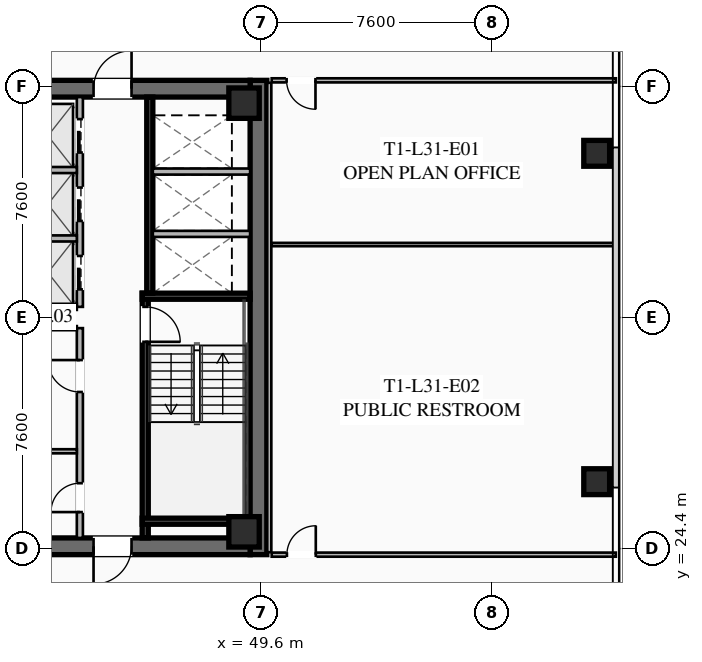
"""IFC4 building model, lengths in metres.
Left out: names, types, materials, properties, quantities, classifications, styles, units other than length and angle.
Written with IfcOpenShell. Run it as: python <this file> out.ifc"""

import sys

from ifc_helpers import new_model, si_unit, direction, frame, frame_2d, origin, origin_2d, place, context, subcontext, project, spatial, rectangle, hollow_rectangle, extrude, element, fill, save


model = new_model("IFC4")
c1 = context("Model", 3, precision=1e-05, world=origin(), true_north=direction((0.0, 1.0)))
c2 = subcontext(c1, "Body", "Model", "MODEL_VIEW")
j1 = project(units=[si_unit("LENGTHUNIT", "METRE"), si_unit("PLANEANGLEUNIT", "RADIAN")], contexts=[c1])
p1 = place(None, origin())
s1 = spatial("IfcSite", under=j1, at=p1, CompositionType="ELEMENT")
p2 = place(p1, origin())
s2 = spatial("IfcBuilding", under=s1, at=p2, CompositionType="ELEMENT")
p3 = place(p2, frame((0.0, 0.0, 117.95)))
s3 = spatial("IfcBuildingStorey", under=s2, at=p3, CompositionType="ELEMENT", Elevation=117.95)
p4 = place(p3, frame((49.525, 39.8, 0.0), z_axis=(0.0, 0.0, 1.0), x_axis=(0.0, -1.0, 0.0)))
e1 = element("IfcWall", 1, at=p4, inside=s3, PredefinedType="SHEAR", context=c2, shape_type="SweptSolid", body=[
    extrude(rectangle(XDim=15.6, YDim=0.55, at=frame_2d((7.8, 0.0))), origin(), (0.0, 0.0, 1.0), 3.55),
])
p5 = place(p3, frame((49.25, 24.475, 0.0), z_axis=(0.0, 0.0, 1.0), x_axis=(-1.0, 0.0, 0.0)))
e2 = element("IfcWall", 2, at=p5, inside=s3, PredefinedType="SHEAR", context=c2, shape_type="SweptSolid", body=[
    extrude(rectangle(XDim=14.5, YDim=0.55, at=frame_2d((7.25, 0.0))), origin(), (0.0, 0.0, 1.0), 3.55),
])
p6 = place(p5, frame((8.95, 0.0, 0.0)))
e3 = element("IfcOpeningElement", 3, at=p6, cuts=e2, PredefinedType="OPENING", context=c2, shape_type="SweptSolid", body=[
    extrude(rectangle(XDim=1.25, YDim=2.25, at=frame_2d((0.625, 1.125))), frame((0.0, 0.285, 0.0), z_axis=(0.0, -1.0, 0.0), x_axis=(1.0, 0.0, 0.0)), (0.0, 0.0, 1.0), 0.57),
])
p7 = place(p5, frame((3.9, 0.0, 0.0)))
e4 = element("IfcOpeningElement", 4, at=p7, cuts=e2, PredefinedType="OPENING", context=c2, shape_type="SweptSolid", body=[
    extrude(rectangle(XDim=1.25, YDim=2.25, at=frame_2d((0.625, 1.125))), frame((0.0, 0.285, 0.0), z_axis=(0.0, -1.0, 0.0), x_axis=(1.0, 0.0, 0.0)), (0.0, 0.0, 1.0), 0.57),
])
p8 = place(p3, frame((34.75, 39.525, 0.0), z_axis=(0.0, 0.0, 1.0), x_axis=(1.0, 0.0, 0.0)))
e5 = element("IfcWall", 5, at=p8, inside=s3, PredefinedType="SHEAR", context=c2, shape_type="SweptSolid", body=[
    extrude(rectangle(XDim=14.5, YDim=0.55, at=frame_2d((7.25, 0.0))), origin(), (0.0, 0.0, 1.0), 3.55),
])
p9 = place(p8, frame((4.3, 0.0, 0.0)))
e6 = element("IfcOpeningElement", 6, at=p9, cuts=e5, PredefinedType="OPENING", context=c2, shape_type="SweptSolid", body=[
    extrude(rectangle(XDim=1.25, YDim=2.25, at=frame_2d((0.625, 1.125))), frame((0.0, 0.285, 0.0), z_axis=(0.0, -1.0, 0.0), x_axis=(1.0, 0.0, 0.0)), (0.0, 0.0, 1.0), 0.57),
])
p10 = place(p8, frame((9.35, 0.0, 0.0)))
e7 = element("IfcOpeningElement", 7, at=p10, cuts=e5, PredefinedType="OPENING", context=c2, shape_type="SweptSolid", body=[
    extrude(rectangle(XDim=1.25, YDim=2.25, at=frame_2d((0.625, 1.125))), frame((0.0, 0.285, 0.0), z_axis=(0.0, -1.0, 0.0), x_axis=(1.0, 0.0, 0.0)), (0.0, 0.0, 1.0), 0.57),
])
for number, where, z_axis, x_axis in (
    (8, (49.05, 24.95, 0.0), (0.0, 0.0, 1.0), (1.0, 0.0, 0.0)),
    (9, (49.05, 39.05, 0.0), (0.0, 0.0, 1.0), (1.0, 0.0, 0.0)),
):
    element("IfcColumn", number, at=place(p3, frame(where, z_axis=z_axis, x_axis=x_axis)), inside=s3, PredefinedType="COLUMN", context=c2, shape_type="SweptSolid", body=[
        extrude(hollow_rectangle(XDim=1.0, YDim=1.0, WallThickness=0.04, at=origin_2d()), origin(), (0.0, 0.0, 1.0), 3.37),
    ])
for number, where, z_axis, x_axis in (
    (10, (60.65, 26.6, 0.0), (0.0, 0.0, 1.0), (1.0, 0.0, 0.0)),
    (11, (60.65, 37.4, 0.0), (0.0, 0.0, 1.0), (1.0, 0.0, 0.0)),
):
    element("IfcColumn", number, at=place(p3, frame(where, z_axis=z_axis, x_axis=x_axis)), inside=s3, PredefinedType="COLUMN", context=c2, shape_type="SweptSolid", body=[
        extrude(hollow_rectangle(XDim=0.85, YDim=0.85, WallThickness=0.035, at=origin_2d()), origin(), (0.0, 0.0, 1.0), 3.37),
    ])
p11 = place(p3, frame((45.8, 32.8, 0.0), z_axis=(0.0, 0.0, 1.0), x_axis=(0.0, -1.0, 0.0)))
e12 = element("IfcWall", 12, at=p11, inside=s3, PredefinedType="SHEAR", context=c2, shape_type="SweptSolid", body=[
    extrude(rectangle(XDim=8.05, YDim=0.2, at=frame_2d((4.025, 0.0))), origin(), (0.0, 0.0, 1.0), 3.37),
])
p12 = place(p11, frame((0.45, 0.0, 0.0)))
e13 = element("IfcOpeningElement", 13, at=p12, cuts=e12, PredefinedType="OPENING", context=c2, shape_type="SweptSolid", body=[
    extrude(rectangle(XDim=1.15, YDim=2.2, at=frame_2d((0.575, 1.1))), frame((0.0, 0.11, 0.0), z_axis=(0.0, -1.0, 0.0), x_axis=(1.0, 0.0, 0.0)), (0.0, 0.0, 1.0), 0.22),
])
for number, where, z_axis, x_axis in (
    (14, (45.7, 32.7, 0.0), (0.0, 0.0, 1.0), (1.0, 0.0, 0.0)),
    (15, (45.7, 25.3, 0.0), (0.0, 0.0, 1.0), (1.0, 0.0, 0.0)),
):
    element("IfcWall", number, at=place(p3, frame(where, z_axis=z_axis, x_axis=x_axis)), inside=s3, PredefinedType="SHEAR", context=c2, shape_type="SweptSolid", body=[
        extrude(rectangle(XDim=3.55, YDim=0.2, at=frame_2d((1.775, 0.0))), origin(), (0.0, 0.0, 1.0), 3.37),
    ])
p13 = place(p3, frame((45.95, 39.25, 0.0), z_axis=(0.0, 0.0, 1.0), x_axis=(0.0, -1.0, 0.0)))
e16 = element("IfcWall", 16, at=p13, inside=s3, PredefinedType="SHEAR", context=c2, shape_type="SweptSolid", body=[
    extrude(rectangle(XDim=6.45, YDim=0.2, at=frame_2d((3.225, 0.0))), origin(), (0.0, 0.0, 1.0), 3.37),
])
for number, where, z_axis, x_axis in (
    (17, (46.05, 34.75, 0.0), (0.0, 0.0, 1.0), (1.0, 0.0, 0.0)),
    (18, (46.05, 36.8, 0.0), (0.0, 0.0, 1.0), (1.0, 0.0, 0.0)),
):
    element("IfcWall", number, at=place(p3, frame(where, z_axis=z_axis, x_axis=x_axis)), inside=s3, PredefinedType="SOLIDWALL", context=c2, shape_type="SweptSolid", body=[
        extrude(rectangle(XDim=3.2, YDim=0.2, at=frame_2d((1.6, 0.0))), origin(), (0.0, 0.0, 1.0), 3.37),
    ])
p14 = place(p3, frame((43.65, 24.75, 0.0), z_axis=(0.0, 0.0, 1.0), x_axis=(0.0, 1.0, 0.0)))
e19 = element("IfcWall", 19, at=p14, inside=s3, PredefinedType="SOLIDWALL", context=c2, shape_type="SweptSolid", body=[
    extrude(rectangle(XDim=6.9, YDim=0.2, at=frame_2d((3.45, 0.0))), origin(), (0.0, 0.0, 1.0), 2.723),
])
p15 = place(p14, frame((0.85, 0.0, 0.0)))
e20 = element("IfcOpeningElement", 20, at=p15, cuts=e19, PredefinedType="OPENING", context=c2, shape_type="SweptSolid", body=[
    extrude(rectangle(XDim=0.95, YDim=2.05, at=frame_2d((0.475, 1.025))), frame((0.0, 0.11, 0.0), z_axis=(0.0, -1.0, 0.0), x_axis=(1.0, 0.0, 0.0)), (0.0, 0.0, 1.0), 0.22),
])
p16 = place(p14, frame((4.8, 0.0, 0.0)))
e21 = element("IfcOpeningElement", 21, at=p16, cuts=e19, PredefinedType="OPENING", context=c2, shape_type="SweptSolid", body=[
    extrude(rectangle(XDim=1.05, YDim=2.2, at=frame_2d((0.525, 1.1))), frame((0.0, 0.11, 0.0), z_axis=(0.0, -1.0, 0.0), x_axis=(1.0, 0.0, 0.0)), (0.0, 0.0, 1.0), 0.22),
])
for number, where, z_axis, x_axis in (
    (22, (41.67, 31.65, 0.0), (0.0, 0.0, 1.0), (1.0, 0.0, 0.0)),
    (23, (41.67, 27.6, 0.0), (0.0, 0.0, 1.0), (1.0, 0.0, 0.0)),
):
    element("IfcWall", number, at=place(p3, frame(where, z_axis=z_axis, x_axis=x_axis)), inside=s3, PredefinedType="PARTITIONING", context=c2, shape_type="SweptSolid", body=[
        extrude(rectangle(XDim=1.88, YDim=0.135, at=frame_2d((0.94, 0.0))), origin(), (0.0, 0.0, 1.0), 2.723),
    ])
p17 = place(p3, frame((43.65, 32.35, 0.0), z_axis=(0.0, 0.0, 1.0), x_axis=(0.0, 1.0, 0.0)))
e24 = element("IfcWall", 24, at=p17, inside=s3, PredefinedType="SOLIDWALL", context=c2, shape_type="SweptSolid", body=[
    extrude(rectangle(XDim=6.9, YDim=0.2, at=frame_2d((3.45, 0.0))), origin(), (0.0, 0.0, 1.0), 3.37),
])
p18 = place(p17, frame((0.575, 0.0, 0.0)))
e25 = element("IfcOpeningElement", 25, at=p18, cuts=e24, PredefinedType="OPENING", context=c2, shape_type="SweptSolid", body=[
    extrude(rectangle(XDim=1.1, YDim=2.2, at=frame_2d((0.55, 1.1))), frame((0.0, 0.11, 0.0), z_axis=(0.0, -1.0, 0.0), x_axis=(1.0, 0.0, 0.0)), (0.0, 0.0, 1.0), 0.22),
])
p19 = place(p17, frame((2.825, 0.0, 0.0)))
e26 = element("IfcOpeningElement", 26, at=p19, cuts=e24, PredefinedType="OPENING", context=c2, shape_type="SweptSolid", body=[
    extrude(rectangle(XDim=1.1, YDim=2.2, at=frame_2d((0.55, 1.1))), frame((0.0, 0.11, 0.0), z_axis=(0.0, -1.0, 0.0), x_axis=(1.0, 0.0, 0.0)), (0.0, 0.0, 1.0), 0.22),
])
p20 = place(p17, frame((5.075, 0.0, 0.0)))
e27 = element("IfcOpeningElement", 27, at=p20, cuts=e24, PredefinedType="OPENING", context=c2, shape_type="SweptSolid", body=[
    extrude(rectangle(XDim=1.1, YDim=2.2, at=frame_2d((0.55, 1.1))), frame((0.0, 0.11, 0.0), z_axis=(0.0, -1.0, 0.0), x_axis=(1.0, 0.0, 0.0)), (0.0, 0.0, 1.0), 0.22),
])
for number, where, z_axis, x_axis in (
    (28, (41.67, 32.35, 0.0), (0.0, 0.0, 1.0), (1.0, 0.0, 0.0)),
    (29, (41.67, 34.6, 0.0), (0.0, 0.0, 1.0), (1.0, 0.0, 0.0)),
    (30, (41.67, 36.85, 0.0), (0.0, 0.0, 1.0), (1.0, 0.0, 0.0)),
):
    element("IfcWall", number, at=place(p3, frame(where, z_axis=z_axis, x_axis=x_axis)), inside=s3, PredefinedType="SOLIDWALL", context=c2, shape_type="SweptSolid", body=[
        extrude(rectangle(XDim=1.88, YDim=0.2, at=frame_2d((0.94, 0.0))), origin(), (0.0, 0.0, 1.0), 3.37),
    ])
p21 = place(p3, frame((49.88, 39.72, 0.0), z_axis=(0.0, 0.0, 1.0), x_axis=(0.0, -1.0, 0.0)))
e31 = element("IfcWall", 31, at=p21, inside=s3, PredefinedType="PARTITIONING", context=c2, shape_type="SweptSolid", body=[
    extrude(rectangle(XDim=15.44, YDim=0.135, at=frame_2d((7.72, 0.0))), origin(), (0.0, 0.0, 1.0), 2.723),
])
p22 = place(p3, frame((61.28, 39.8, 0.0), z_axis=(0.0, 0.0, 1.0), x_axis=(-1.0, 0.0, 0.0)))
e32 = element("IfcWall", 32, at=p22, inside=s3, PredefinedType="PARTITIONING", context=c2, shape_type="SweptSolid", body=[
    extrude(rectangle(XDim=11.32, YDim=0.135, at=frame_2d((5.66, 0.0))), origin(), (0.0, 0.0, 1.0), 2.723),
])
p23 = place(p22, frame((9.88, 0.0, 0.0)))
e33 = element("IfcOpeningElement", 33, at=p23, cuts=e32, PredefinedType="OPENING", context=c2, shape_type="SweptSolid", body=[
    extrude(rectangle(XDim=0.95, YDim=2.05, at=frame_2d((0.475, 1.025))), frame((0.0, 0.077, 0.0), z_axis=(0.0, -1.0, 0.0), x_axis=(1.0, 0.0, 0.0)), (0.0, 0.0, 1.0), 0.155),
])
p24 = place(p3, frame((49.96, 24.2, 0.0), z_axis=(0.0, 0.0, 1.0), x_axis=(1.0, 0.0, 0.0)))
e34 = element("IfcWall", 34, at=p24, inside=s3, PredefinedType="PARTITIONING", context=c2, shape_type="SweptSolid", body=[
    extrude(rectangle(XDim=11.32, YDim=0.135, at=frame_2d((5.66, 0.0))), origin(), (0.0, 0.0, 1.0), 2.723),
])
p25 = place(p24, frame((0.5, 0.0, 0.0)))
e35 = element("IfcOpeningElement", 35, at=p25, cuts=e34, PredefinedType="OPENING", context=c2, shape_type="SweptSolid", body=[
    extrude(rectangle(XDim=0.95, YDim=2.05, at=frame_2d((0.475, 1.025))), frame((0.0, 0.077, 0.0), z_axis=(0.0, -1.0, 0.0), x_axis=(1.0, 0.0, 0.0)), (0.0, 0.0, 1.0), 0.155),
])
p26 = place(p3, frame((49.96, 34.4, 0.0), z_axis=(0.0, 0.0, 1.0), x_axis=(1.0, 0.0, 0.0)))
e36 = element("IfcWall", 36, at=p26, inside=s3, PredefinedType="PARTITIONING", context=c2, shape_type="SweptSolid", body=[
    extrude(rectangle(XDim=11.32, YDim=0.11, at=frame_2d((5.66, 0.0))), origin(), (0.0, 0.0, 1.0), 2.723),
])
p27 = place(p10, origin())
e37 = element("IfcDoor", 37, at=p27, inside=s3, OperationType="SINGLE_SWING_RIGHT", PredefinedType="DOOR", context=c2, shape_type="SweptSolid", body=[
    extrude(rectangle(XDim=1.25, YDim=2.25, at=frame_2d((0.625, 1.125))), frame((0.0, 0.025, 0.0), z_axis=(0.0, -1.0, 0.0), x_axis=(1.0, 0.0, 0.0)), (0.0, 0.0, 1.0), 0.05),
])
fill(e7, e37)
p28 = place(p7, origin())
e38 = element("IfcDoor", 38, at=p28, inside=s3, OperationType="SINGLE_SWING_RIGHT", PredefinedType="DOOR", context=c2, shape_type="SweptSolid", body=[
    extrude(rectangle(XDim=1.25, YDim=2.25, at=frame_2d((0.625, 1.125))), frame((0.0, 0.025, 0.0), z_axis=(0.0, -1.0, 0.0), x_axis=(1.0, 0.0, 0.0)), (0.0, 0.0, 1.0), 0.05),
])
fill(e4, e38)
p29 = place(p12, origin())
e39 = element("IfcDoor", 39, at=p29, inside=s3, OperationType="SINGLE_SWING_RIGHT", PredefinedType="DOOR", context=c2, shape_type="SweptSolid", body=[
    extrude(rectangle(XDim=1.15, YDim=2.2, at=frame_2d((0.575, 1.1))), frame((0.0, 0.025, 0.0), z_axis=(0.0, -1.0, 0.0), x_axis=(1.0, 0.0, 0.0)), (0.0, 0.0, 1.0), 0.05),
])
fill(e13, e39)
p30 = place(p15, origin())
e40 = element("IfcDoor", 40, at=p30, inside=s3, OperationType="SINGLE_SWING_LEFT", PredefinedType="DOOR", context=c2, shape_type="SweptSolid", body=[
    extrude(rectangle(XDim=0.95, YDim=2.05, at=frame_2d((0.475, 1.025))), frame((0.0, 0.025, 0.0), z_axis=(0.0, -1.0, 0.0), x_axis=(1.0, 0.0, 0.0)), (0.0, 0.0, 1.0), 0.05),
])
fill(e20, e40)
p31 = place(p16, origin())
e41 = element("IfcDoor", 41, at=p31, inside=s3, OperationType="SINGLE_SWING_RIGHT", PredefinedType="DOOR", context=c2, shape_type="SweptSolid", body=[
    extrude(rectangle(XDim=1.05, YDim=2.2, at=frame_2d((0.525, 1.1))), frame((0.0, 0.025, 0.0), z_axis=(0.0, -1.0, 0.0), x_axis=(1.0, 0.0, 0.0)), (0.0, 0.0, 1.0), 0.05),
])
fill(e21, e41)
p32 = place(p23, origin())
e42 = element("IfcDoor", 42, at=p32, inside=s3, OperationType="SINGLE_SWING_LEFT", PredefinedType="DOOR", context=c2, shape_type="SweptSolid", body=[
    extrude(rectangle(XDim=0.95, YDim=2.05, at=frame_2d((0.475, 1.025))), frame((0.0, 0.025, 0.0), z_axis=(0.0, -1.0, 0.0), x_axis=(1.0, 0.0, 0.0)), (0.0, 0.0, 1.0), 0.05),
])
fill(e33, e42)
p33 = place(p25, origin())
e43 = element("IfcDoor", 43, at=p33, inside=s3, OperationType="SINGLE_SWING_RIGHT", PredefinedType="DOOR", context=c2, shape_type="SweptSolid", body=[
    extrude(rectangle(XDim=0.95, YDim=2.05, at=frame_2d((0.475, 1.025))), frame((0.0, 0.025, 0.0), z_axis=(0.0, -1.0, 0.0), x_axis=(1.0, 0.0, 0.0)), (0.0, 0.0, 1.0), 0.05),
])
fill(e35, e43)
p34 = place(p18, origin())
e44 = element("IfcDoor", 44, at=p34, inside=s3, OperationType="SLIDING_TO_LEFT", PredefinedType="DOOR", context=c2, shape_type="SweptSolid", body=[
    extrude(rectangle(XDim=1.1, YDim=2.2, at=frame_2d((0.55, 1.1))), frame((0.0, 0.025, 0.0), z_axis=(0.0, -1.0, 0.0), x_axis=(1.0, 0.0, 0.0)), (0.0, 0.0, 1.0), 0.05),
])
fill(e25, e44)
p35 = place(p19, origin())
e45 = element("IfcDoor", 45, at=p35, inside=s3, OperationType="SLIDING_TO_LEFT", PredefinedType="DOOR", context=c2, shape_type="SweptSolid", body=[
    extrude(rectangle(XDim=1.1, YDim=2.2, at=frame_2d((0.55, 1.1))), frame((0.0, 0.025, 0.0), z_axis=(0.0, -1.0, 0.0), x_axis=(1.0, 0.0, 0.0)), (0.0, 0.0, 1.0), 0.05),
])
fill(e26, e45)
p36 = place(p20, origin())
e46 = element("IfcDoor", 46, at=p36, inside=s3, OperationType="SLIDING_TO_LEFT", PredefinedType="DOOR", context=c2, shape_type="SweptSolid", body=[
    extrude(rectangle(XDim=1.1, YDim=2.2, at=frame_2d((0.55, 1.1))), frame((0.0, 0.025, 0.0), z_axis=(0.0, -1.0, 0.0), x_axis=(1.0, 0.0, 0.0)), (0.0, 0.0, 1.0), 0.05),
])
fill(e27, e46)
save(model, sys.argv[1])
